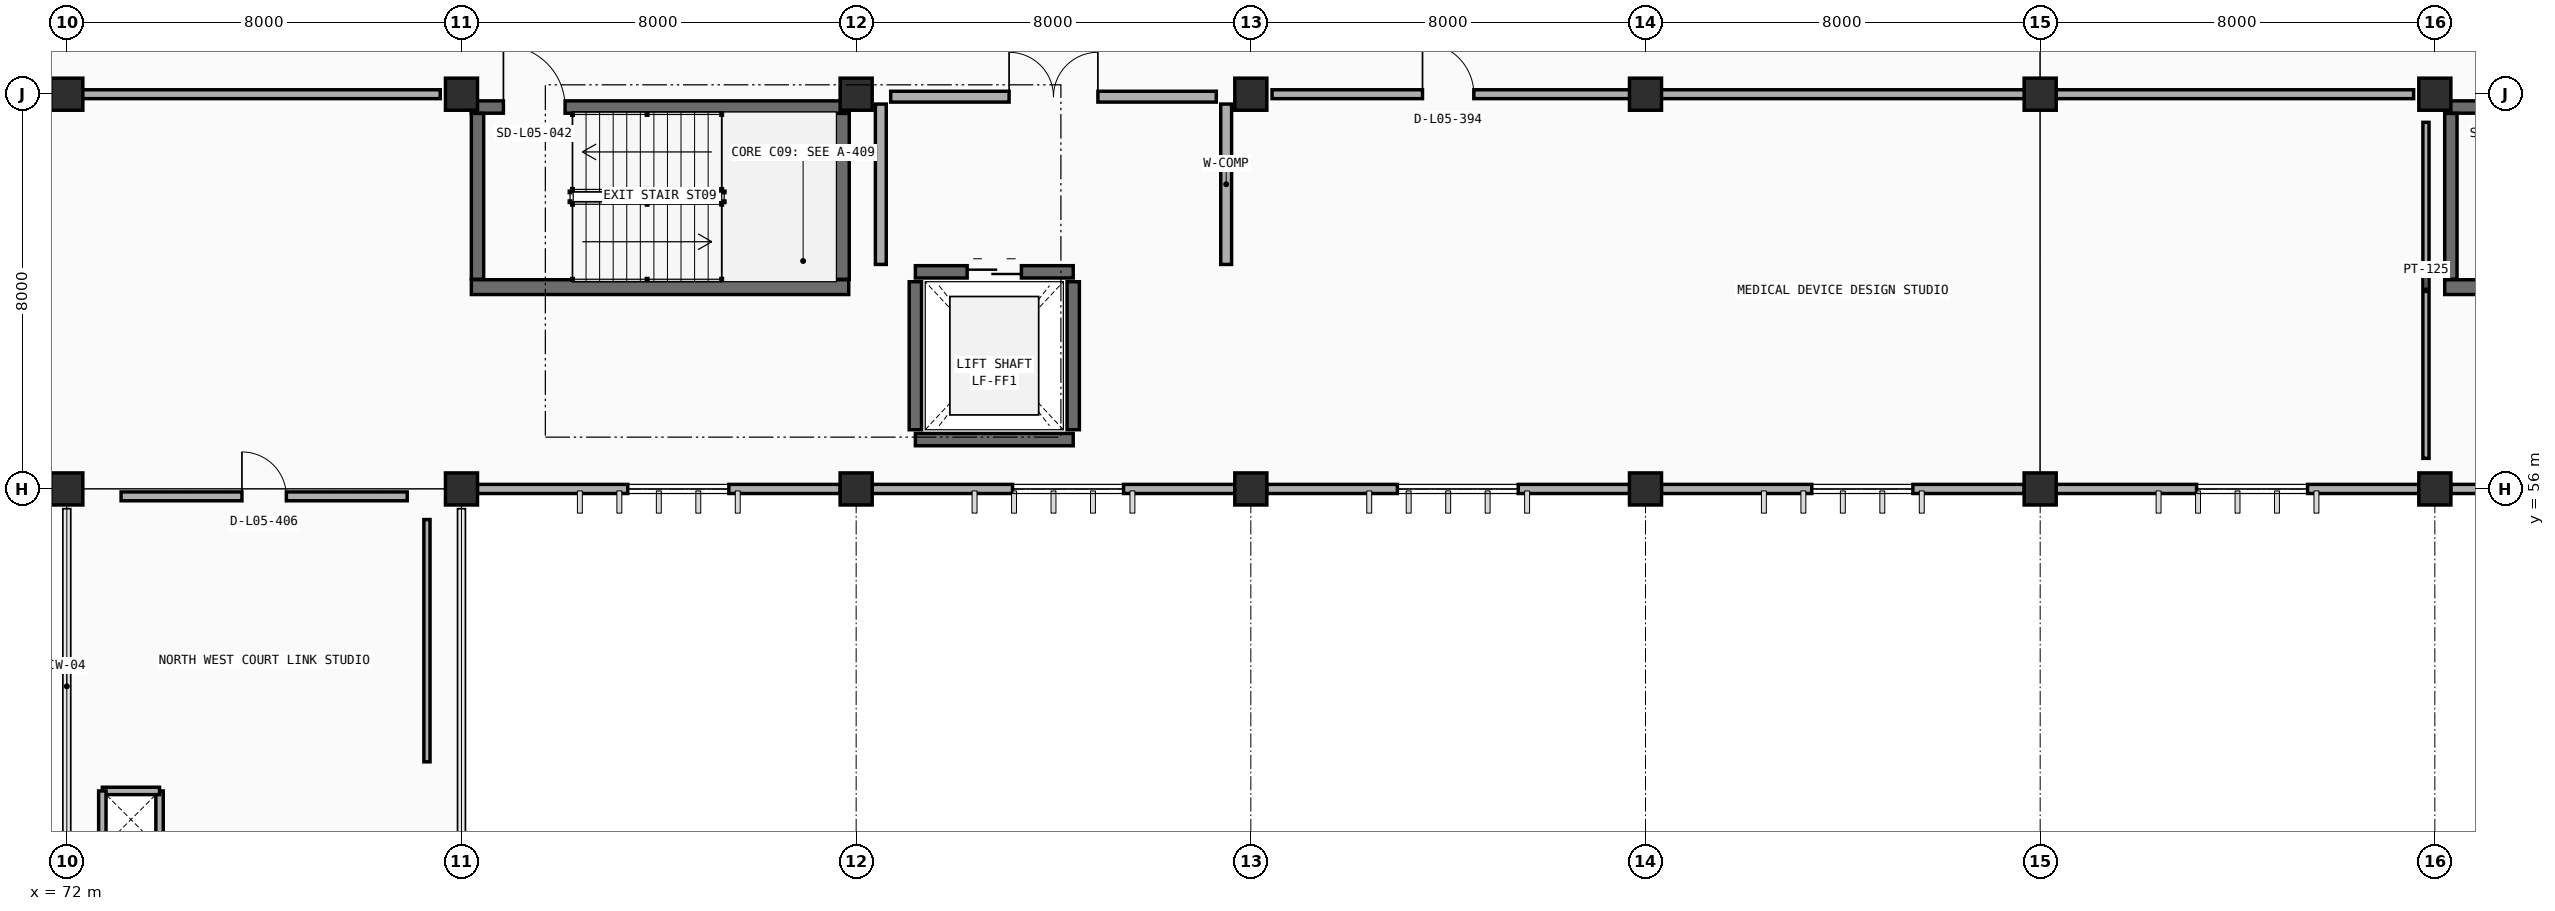
"""IFC4 building model, lengths in metres.
Left out: names, types, materials, properties, quantities, classifications, styles, units other than length and angle.
Written with IfcOpenShell. Run it as: python <this file> out.ifc"""

import sys

from ifc_helpers import new_model, si_unit, direction, frame, frame_2d, origin, origin_2d, place, context, subcontext, project, spatial, rectangle, extrude, element, fill, save


model = new_model("IFC4")
c1 = context("Model", 3, precision=1e-05, world=origin(), true_north=direction((0.0, 1.0)))
c2 = subcontext(c1, "Body", "Model", "MODEL_VIEW")
j1 = project(units=[si_unit("LENGTHUNIT", "METRE"), si_unit("PLANEANGLEUNIT", "RADIAN")], contexts=[c1])
p1 = place(None, origin())
s1 = spatial("IfcSite", under=j1, at=p1, CompositionType="ELEMENT")
p2 = place(p1, origin())
s2 = spatial("IfcBuilding", under=s1, at=p2, CompositionType="ELEMENT")
p3 = place(p2, frame((0.0, 0.0, 18.0)))
s3 = spatial("IfcBuildingStorey", under=s2, at=p3, CompositionType="ELEMENT", Elevation=18.0)
for number, where, z_axis, x_axis in (
    (1, (72.0, 56.0, 0.0), (0.0, 0.0, 1.0), (1.0, 0.0, 0.0)),
    (2, (80.0, 56.0, 0.0), (0.0, 0.0, 1.0), (1.0, 0.0, 0.0)),
    (3, (88.0, 56.0, 0.0), (0.0, 0.0, 1.0), (1.0, 0.0, 0.0)),
    (4, (96.0, 56.0, 0.0), (0.0, 0.0, 1.0), (1.0, 0.0, 0.0)),
    (5, (104.0, 56.0, 0.0), (0.0, 0.0, 1.0), (1.0, 0.0, 0.0)),
    (6, (112.0, 56.0, 0.0), (0.0, 0.0, 1.0), (1.0, 0.0, 0.0)),
    (7, (120.0, 56.0, 0.0), (0.0, 0.0, 1.0), (1.0, 0.0, 0.0)),
    (8, (72.0, 64.0, 0.0), (0.0, 0.0, 1.0), (1.0, 0.0, 0.0)),
    (9, (80.0, 64.0, 0.0), (0.0, 0.0, 1.0), (1.0, 0.0, 0.0)),
    (10, (88.0, 64.0, 0.0), (0.0, 0.0, 1.0), (1.0, 0.0, 0.0)),
    (11, (96.0, 64.0, 0.0), (0.0, 0.0, 1.0), (1.0, 0.0, 0.0)),
    (12, (104.0, 64.0, 0.0), (0.0, 0.0, 1.0), (1.0, 0.0, 0.0)),
    (13, (112.0, 64.0, 0.0), (0.0, 0.0, 1.0), (1.0, 0.0, 0.0)),
    (14, (120.0, 64.0, 0.0), (0.0, 0.0, 1.0), (1.0, 0.0, 0.0)),
):
    element("IfcColumn", number, at=place(p3, frame(where, z_axis=z_axis, x_axis=x_axis)), inside=s3, PredefinedType="COLUMN", context=c2, shape_type="SweptSolid", body=[
        extrude(rectangle(XDim=0.65, YDim=0.65, at=origin_2d()), origin(), (0.0, 0.0, 1.0), 4.2),
    ])
p4 = place(p3, frame((87.678, 56.0, 0.0), z_axis=(0.0, 0.0, 1.0), x_axis=(-1.0, 0.0, 0.0)))
e15 = element("IfcWall", 15, at=p4, inside=s3, PredefinedType="STANDARD", context=c2, shape_type="SweptSolid", body=[
    extrude(rectangle(XDim=7.356, YDim=0.185, at=frame_2d((3.678, 0.0))), origin(), (0.0, 0.0, 1.0), 3.335),
])
p5 = place(p4, frame((2.258, 0.0, 0.9)))
e16 = element("IfcOpeningElement", 16, at=p5, cuts=e15, PredefinedType="OPENING", context=c2, shape_type="SweptSolid", body=[
    extrude(rectangle(XDim=2.05, YDim=2.0, at=frame_2d((1.025, 1.0))), frame((0.0, 0.103, 0.0), z_axis=(0.0, -1.0, 0.0), x_axis=(1.0, 0.0, 0.0)), (0.0, 0.0, 1.0), 0.205),
])
p6 = place(p3, frame((95.678, 56.0, 0.0), z_axis=(0.0, 0.0, 1.0), x_axis=(-1.0, 0.0, 0.0)))
e17 = element("IfcWall", 17, at=p6, inside=s3, PredefinedType="STANDARD", context=c2, shape_type="SweptSolid", body=[
    extrude(rectangle(XDim=7.356, YDim=0.185, at=frame_2d((3.678, 0.0))), origin(), (0.0, 0.0, 1.0), 3.335),
])
p7 = place(p6, frame((2.258, 0.0, 0.9)))
e18 = element("IfcOpeningElement", 18, at=p7, cuts=e17, PredefinedType="OPENING", context=c2, shape_type="SweptSolid", body=[
    extrude(rectangle(XDim=2.25, YDim=2.0, at=frame_2d((1.125, 1.0))), frame((0.0, 0.103, 0.0), z_axis=(0.0, -1.0, 0.0), x_axis=(1.0, 0.0, 0.0)), (0.0, 0.0, 1.0), 0.205),
])
p8 = place(p3, frame((103.678, 56.0, 0.0), z_axis=(0.0, 0.0, 1.0), x_axis=(-1.0, 0.0, 0.0)))
e19 = element("IfcWall", 19, at=p8, inside=s3, PredefinedType="STANDARD", context=c2, shape_type="SweptSolid", body=[
    extrude(rectangle(XDim=7.356, YDim=0.185, at=frame_2d((3.678, 0.0))), origin(), (0.0, 0.0, 1.0), 3.335),
])
p9 = place(p8, frame((2.258, 0.0, 0.9)))
e20 = element("IfcOpeningElement", 20, at=p9, cuts=e19, PredefinedType="OPENING", context=c2, shape_type="SweptSolid", body=[
    extrude(rectangle(XDim=2.45, YDim=2.0, at=frame_2d((1.225, 1.0))), frame((0.0, 0.103, 0.0), z_axis=(0.0, -1.0, 0.0), x_axis=(1.0, 0.0, 0.0)), (0.0, 0.0, 1.0), 0.205),
])
p10 = place(p3, frame((111.678, 56.0, 0.0), z_axis=(0.0, 0.0, 1.0), x_axis=(-1.0, 0.0, 0.0)))
e21 = element("IfcWall", 21, at=p10, inside=s3, PredefinedType="STANDARD", context=c2, shape_type="SweptSolid", body=[
    extrude(rectangle(XDim=7.356, YDim=0.185, at=frame_2d((3.678, 0.0))), origin(), (0.0, 0.0, 1.0), 3.335),
])
p11 = place(p10, frame((2.258, 0.0, 0.9)))
e22 = element("IfcOpeningElement", 22, at=p11, cuts=e21, PredefinedType="OPENING", context=c2, shape_type="SweptSolid", body=[
    extrude(rectangle(XDim=2.05, YDim=2.0, at=frame_2d((1.025, 1.0))), frame((0.0, 0.103, 0.0), z_axis=(0.0, -1.0, 0.0), x_axis=(1.0, 0.0, 0.0)), (0.0, 0.0, 1.0), 0.205),
])
p12 = place(p3, frame((119.678, 56.0, 0.0), z_axis=(0.0, 0.0, 1.0), x_axis=(-1.0, 0.0, 0.0)))
e23 = element("IfcWall", 23, at=p12, inside=s3, PredefinedType="STANDARD", context=c2, shape_type="SweptSolid", body=[
    extrude(rectangle(XDim=7.356, YDim=0.185, at=frame_2d((3.678, 0.0))), origin(), (0.0, 0.0, 1.0), 3.335),
])
p13 = place(p12, frame((2.258, 0.0, 0.9)))
e24 = element("IfcOpeningElement", 24, at=p13, cuts=e23, PredefinedType="OPENING", context=c2, shape_type="SweptSolid", body=[
    extrude(rectangle(XDim=2.25, YDim=2.0, at=frame_2d((1.125, 1.0))), frame((0.0, 0.103, 0.0), z_axis=(0.0, -1.0, 0.0), x_axis=(1.0, 0.0, 0.0)), (0.0, 0.0, 1.0), 0.205),
])
p14 = place(p3, frame((127.678, 56.0, 0.0), z_axis=(0.0, 0.0, 1.0), x_axis=(-1.0, 0.0, 0.0)))
e25 = element("IfcWall", 25, at=p14, inside=s3, PredefinedType="STANDARD", context=c2, shape_type="SweptSolid", body=[
    extrude(rectangle(XDim=7.356, YDim=0.185, at=frame_2d((3.678, 0.0))), origin(), (0.0, 0.0, 1.0), 3.335),
])
p15 = place(p14, frame((2.258, 0.0, 0.9)))
e26 = element("IfcOpeningElement", 26, at=p15, cuts=e25, PredefinedType="OPENING", context=c2, shape_type="SweptSolid", body=[
    extrude(rectangle(XDim=2.45, YDim=2.0, at=frame_2d((1.225, 1.0))), frame((0.0, 0.103, 0.0), z_axis=(0.0, -1.0, 0.0), x_axis=(1.0, 0.0, 0.0)), (0.0, 0.0, 1.0), 0.205),
])
p16 = place(p3, frame((80.2, 60.09, 0.0), z_axis=(0.0, 0.0, 1.0), x_axis=(1.0, 0.0, 0.0)))
e27 = element("IfcWall", 27, at=p16, inside=s3, PredefinedType="SHEAR", context=c2, shape_type="SweptSolid", body=[
    extrude(rectangle(XDim=7.65, YDim=0.3, at=frame_2d((3.825, 0.0))), origin(), (0.0, 0.0, 1.0), 4.2),
])
p17 = place(p3, frame((87.71, 60.25, 0.0), z_axis=(0.0, 0.0, 1.0), x_axis=(0.0, 1.0, 0.0)))
e28 = element("IfcWall", 28, at=p17, inside=s3, PredefinedType="SHEAR", context=c2, shape_type="SweptSolid", body=[
    extrude(rectangle(XDim=3.36, YDim=0.3, at=frame_2d((1.68, 0.0))), origin(), (0.0, 0.0, 1.0), 4.2),
])
p18 = place(p3, frame((80.2, 63.74, 0.0), z_axis=(0.0, 0.0, 1.0), x_axis=(1.0, 0.0, 0.0)))
e29 = element("IfcWall", 29, at=p18, inside=s3, PredefinedType="SOLIDWALL", context=c2, shape_type="SweptSolid", body=[
    extrude(rectangle(XDim=7.65, YDim=0.25, at=frame_2d((3.825, 0.0))), origin(), (0.0, 0.0, 1.0), 4.2),
])
p19 = place(p18, frame((0.65, 0.0, 0.0)))
e30 = element("IfcOpeningElement", 30, at=p19, cuts=e29, PredefinedType="OPENING", context=c2, shape_type="SweptSolid", body=[
    extrude(rectangle(XDim=1.25, YDim=2.15, at=frame_2d((0.625, 1.075))), frame((0.0, 0.135, 0.0), z_axis=(0.0, -1.0, 0.0), x_axis=(1.0, 0.0, 0.0)), (0.0, 0.0, 1.0), 0.27),
])
p20 = place(p3, frame((80.325, 60.25, 0.0), z_axis=(0.0, 0.0, 1.0), x_axis=(0.0, 1.0, 0.0)))
e31 = element("IfcWall", 31, at=p20, inside=s3, PredefinedType="SOLIDWALL", context=c2, shape_type="SweptSolid", body=[
    extrude(rectangle(XDim=3.36, YDim=0.25, at=frame_2d((1.68, 0.0))), origin(), (0.0, 0.0, 1.0), 4.2),
])
p21 = place(p3, frame((120.2, 60.09, 0.0), z_axis=(0.0, 0.0, 1.0), x_axis=(1.0, 0.0, 0.0)))
e32 = element("IfcWall", 32, at=p21, inside=s3, PredefinedType="SHEAR", context=c2, shape_type="SweptSolid", body=[
    extrude(rectangle(XDim=7.65, YDim=0.3, at=frame_2d((3.825, 0.0))), origin(), (0.0, 0.0, 1.0), 4.2),
])
p22 = place(p3, frame((120.2, 63.74, 0.0), z_axis=(0.0, 0.0, 1.0), x_axis=(1.0, 0.0, 0.0)))
e33 = element("IfcWall", 33, at=p22, inside=s3, PredefinedType="SOLIDWALL", context=c2, shape_type="SweptSolid", body=[
    extrude(rectangle(XDim=7.65, YDim=0.25, at=frame_2d((3.825, 0.0))), origin(), (0.0, 0.0, 1.0), 4.2),
])
p23 = place(p22, frame((0.65, 0.0, 0.0)))
e34 = element("IfcOpeningElement", 34, at=p23, cuts=e33, PredefinedType="OPENING", context=c2, shape_type="SweptSolid", body=[
    extrude(rectangle(XDim=1.25, YDim=2.15, at=frame_2d((0.625, 1.075))), frame((0.0, 0.135, 0.0), z_axis=(0.0, -1.0, 0.0), x_axis=(1.0, 0.0, 0.0)), (0.0, 0.0, 1.0), 0.27),
])
p24 = place(p3, frame((120.325, 60.25, 0.0), z_axis=(0.0, 0.0, 1.0), x_axis=(0.0, 1.0, 0.0)))
e35 = element("IfcWall", 35, at=p24, inside=s3, PredefinedType="SOLIDWALL", context=c2, shape_type="SweptSolid", body=[
    extrude(rectangle(XDim=3.36, YDim=0.25, at=frame_2d((1.68, 0.0))), origin(), (0.0, 0.0, 1.0), 4.2),
])
p25 = place(p3, frame((89.2, 57.0, 0.0), z_axis=(0.0, 0.0, 1.0), x_axis=(1.0, 0.0, 0.0)))
e36 = element("IfcWall", 36, at=p25, inside=s3, PredefinedType="SOLIDWALL", context=c2, shape_type="SweptSolid", body=[
    extrude(rectangle(XDim=3.2, YDim=0.25, at=frame_2d((1.6, 0.0))), origin(), (0.0, 0.0, 1.0), 4.2),
])
p26 = place(p3, frame((89.2, 60.4, 0.0), z_axis=(0.0, 0.0, 1.0), x_axis=(1.0, 0.0, 0.0)))
e37 = element("IfcWall", 37, at=p26, inside=s3, PredefinedType="SOLIDWALL", context=c2, shape_type="SweptSolid", body=[
    extrude(rectangle(XDim=3.2, YDim=0.25, at=frame_2d((1.6, 0.0))), origin(), (0.0, 0.0, 1.0), 4.2),
])
p27 = place(p26, frame((1.05, 0.0, 0.0)))
e38 = element("IfcOpeningElement", 38, at=p27, cuts=e37, PredefinedType="OPENING", context=c2, shape_type="SweptSolid", body=[
    extrude(rectangle(XDim=1.1, YDim=2.15, at=frame_2d((0.55, 1.075))), frame((0.0, 0.135, 0.0), z_axis=(0.0, -1.0, 0.0), x_axis=(1.0, 0.0, 0.0)), (0.0, 0.0, 1.0), 0.27),
])
for number, where, z_axis, x_axis in (
    (39, (89.2, 57.2, 0.0), (0.0, 0.0, 1.0), (0.0, 1.0, 0.0)),
    (40, (92.4, 57.2, 0.0), (0.0, 0.0, 1.0), (0.0, 1.0, 0.0)),
):
    element("IfcWall", number, at=place(p3, frame(where, z_axis=z_axis, x_axis=x_axis)), inside=s3, PredefinedType="SOLIDWALL", context=c2, shape_type="SweptSolid", body=[
        extrude(rectangle(XDim=3.0, YDim=0.25, at=frame_2d((1.5, 0.0))), origin(), (0.0, 0.0, 1.0), 4.2),
    ])
p28 = place(p3, frame((88.7, 63.95, 0.0), z_axis=(0.0, 0.0, 1.0), x_axis=(1.0, 0.0, 0.0)))
e41 = element("IfcWall", 41, at=p28, inside=s3, PredefinedType="PARTITIONING", context=c2, shape_type="SweptSolid", body=[
    extrude(rectangle(XDim=6.6, YDim=0.22, at=frame_2d((3.3, 0.0))), origin(), (0.0, 0.0, 1.0), 3.3),
])
p29 = place(p28, frame((2.4, 0.0, 0.0)))
e42 = element("IfcOpeningElement", 42, at=p29, cuts=e41, PredefinedType="OPENING", context=c2, shape_type="SweptSolid", body=[
    extrude(rectangle(XDim=1.8, YDim=2.2, at=frame_2d((0.9, 1.1))), frame((0.0, 0.12, 0.0), z_axis=(0.0, -1.0, 0.0), x_axis=(1.0, 0.0, 0.0)), (0.0, 0.0, 1.0), 0.24),
])
for number, where, z_axis, x_axis in (
    (43, (88.5, 60.55, 0.0), (0.0, 0.0, 1.0), (0.0, 1.0, 0.0)),
    (44, (95.5, 60.55, 0.0), (0.0, 0.0, 1.0), (0.0, 1.0, 0.0)),
):
    element("IfcWall", number, at=place(p3, frame(where, z_axis=z_axis, x_axis=x_axis)), inside=s3, PredefinedType="PARTITIONING", context=c2, shape_type="SweptSolid", body=[
        extrude(rectangle(XDim=3.25, YDim=0.22, at=frame_2d((1.625, 0.0))), origin(), (0.0, 0.0, 1.0), 3.3),
    ])
for number, where, z_axis, x_axis in (
    (45, (73.88, 48.72, 0.0), (0.0, 0.0, 1.0), (0.0, 1.0, 0.0)),
    (46, (73.88, 49.88, 0.0), (0.0, 0.0, 1.0), (-1.0, 0.0, 0.0)),
    (47, (72.72, 49.88, 0.0), (0.0, 0.0, 1.0), (0.0, -1.0, 0.0)),
):
    element("IfcWall", number, at=place(p3, frame(where, z_axis=z_axis, x_axis=x_axis)), inside=s3, PredefinedType="PARTITIONING", context=c2, shape_type="SweptSolid", body=[
        extrude(rectangle(XDim=1.16, YDim=0.15, at=frame_2d((0.58, 0.0))), origin(), (0.0, 0.0, 1.0), 3.9),
    ])
p30 = place(p3, frame((56.43, 64.0, 0.0), z_axis=(0.0, 0.0, 1.0), x_axis=(1.0, 0.0, 0.0)))
e48 = element("IfcWall", 48, at=p30, inside=s3, PredefinedType="PARTITIONING", context=c2, shape_type="SweptSolid", body=[
    extrude(rectangle(XDim=23.14, YDim=0.18, at=frame_2d((11.57, 0.0))), origin(), (0.0, 0.0, 1.0), 3.3),
])
p31 = place(p30, frame((2.96, 0.0, 0.0)))
e49 = element("IfcOpeningElement", 49, at=p31, cuts=e48, PredefinedType="OPENING", context=c2, shape_type="SweptSolid", body=[
    extrude(rectangle(XDim=1.22, YDim=2.18, at=frame_2d((0.61, 1.09))), frame((0.0, 0.1, 0.0), z_axis=(0.0, -1.0, 0.0), x_axis=(1.0, 0.0, 0.0)), (0.0, 0.0, 1.0), 0.2),
])
p32 = place(p3, frame((96.43, 64.0, 0.0), z_axis=(0.0, 0.0, 1.0), x_axis=(1.0, 0.0, 0.0)))
e50 = element("IfcWall", 50, at=p32, inside=s3, PredefinedType="PARTITIONING", context=c2, shape_type="SweptSolid", body=[
    extrude(rectangle(XDim=23.14, YDim=0.18, at=frame_2d((11.57, 0.0))), origin(), (0.0, 0.0, 1.0), 3.3),
])
p33 = place(p32, frame((3.05, 0.0, 0.0)))
e51 = element("IfcOpeningElement", 51, at=p33, cuts=e50, PredefinedType="OPENING", context=c2, shape_type="SweptSolid", body=[
    extrude(rectangle(XDim=1.04, YDim=2.15, at=frame_2d((0.52, 1.075))), frame((0.0, 0.1, 0.0), z_axis=(0.0, -1.0, 0.0), x_axis=(1.0, 0.0, 0.0)), (0.0, 0.0, 1.0), 0.2),
])
p34 = place(p3, frame((119.82, 56.62, 0.0), z_axis=(0.0, 0.0, 1.0), x_axis=(0.0, 1.0, 0.0)))
e52 = element("IfcWall", 52, at=p34, inside=s3, PredefinedType="PARTITIONING", context=c2, shape_type="SweptSolid", body=[
    extrude(rectangle(XDim=6.81, YDim=0.125, at=frame_2d((3.405, 0.0))), origin(), (0.0, 0.0, 1.0), 3.3),
])
p35 = place(p3, frame((73.1, 55.85, 0.0), z_axis=(0.0, 0.0, 1.0), x_axis=(1.0, 0.0, 0.0)))
e53 = element("IfcWall", 53, at=p35, inside=s3, PredefinedType="PARTITIONING", context=c2, shape_type="SweptSolid", body=[
    extrude(rectangle(XDim=5.8, YDim=0.18, at=frame_2d((2.9, 0.0))), origin(), (0.0, 0.0, 1.0), 3.3),
])
p36 = place(p35, frame((2.45, 0.0, 0.0)))
e54 = element("IfcOpeningElement", 54, at=p36, cuts=e53, PredefinedType="OPENING", context=c2, shape_type="SweptSolid", body=[
    extrude(rectangle(XDim=0.9, YDim=2.1, at=frame_2d((0.45, 1.05))), frame((0.0, 0.1, 0.0), z_axis=(0.0, -1.0, 0.0), x_axis=(1.0, 0.0, 0.0)), (0.0, 0.0, 1.0), 0.2),
])
p37 = place(p3, frame((79.3, 50.47, 0.0), z_axis=(0.0, 0.0, 1.0), x_axis=(0.0, 1.0, 0.0)))
e55 = element("IfcWall", 55, at=p37, inside=s3, PredefinedType="PARTITIONING", context=c2, shape_type="SweptSolid", body=[
    extrude(rectangle(XDim=4.91, YDim=0.125, at=frame_2d((2.455, 0.0))), origin(), (0.0, 0.0, 1.0), 3.3),
])
p38 = place(p5, origin())
e56 = element("IfcWindow", 56, at=p38, inside=s3, PartitioningType="DOUBLE_PANEL_VERTICAL", PredefinedType="WINDOW", context=c2, shape_type="SweptSolid", body=[
    extrude(rectangle(XDim=2.05, YDim=2.0, at=frame_2d((1.025, 1.0))), frame((0.0, 0.03, 0.0), z_axis=(0.0, -1.0, 0.0), x_axis=(1.0, 0.0, 0.0)), (0.0, 0.0, 1.0), 0.06),
])
fill(e16, e56)
p39 = place(p7, origin())
e57 = element("IfcWindow", 57, at=p39, inside=s3, PartitioningType="DOUBLE_PANEL_VERTICAL", PredefinedType="WINDOW", context=c2, shape_type="SweptSolid", body=[
    extrude(rectangle(XDim=2.25, YDim=2.0, at=frame_2d((1.125, 1.0))), frame((0.0, 0.03, 0.0), z_axis=(0.0, -1.0, 0.0), x_axis=(1.0, 0.0, 0.0)), (0.0, 0.0, 1.0), 0.06),
])
fill(e18, e57)
p40 = place(p9, origin())
e58 = element("IfcWindow", 58, at=p40, inside=s3, PartitioningType="DOUBLE_PANEL_VERTICAL", PredefinedType="WINDOW", context=c2, shape_type="SweptSolid", body=[
    extrude(rectangle(XDim=2.45, YDim=2.0, at=frame_2d((1.225, 1.0))), frame((0.0, 0.03, 0.0), z_axis=(0.0, -1.0, 0.0), x_axis=(1.0, 0.0, 0.0)), (0.0, 0.0, 1.0), 0.06),
])
fill(e20, e58)
p41 = place(p11, origin())
e59 = element("IfcWindow", 59, at=p41, inside=s3, PartitioningType="DOUBLE_PANEL_VERTICAL", PredefinedType="WINDOW", context=c2, shape_type="SweptSolid", body=[
    extrude(rectangle(XDim=2.05, YDim=2.0, at=frame_2d((1.025, 1.0))), frame((0.0, 0.03, 0.0), z_axis=(0.0, -1.0, 0.0), x_axis=(1.0, 0.0, 0.0)), (0.0, 0.0, 1.0), 0.06),
])
fill(e22, e59)
p42 = place(p13, origin())
e60 = element("IfcWindow", 60, at=p42, inside=s3, PartitioningType="DOUBLE_PANEL_VERTICAL", PredefinedType="WINDOW", context=c2, shape_type="SweptSolid", body=[
    extrude(rectangle(XDim=2.25, YDim=2.0, at=frame_2d((1.125, 1.0))), frame((0.0, 0.03, 0.0), z_axis=(0.0, -1.0, 0.0), x_axis=(1.0, 0.0, 0.0)), (0.0, 0.0, 1.0), 0.06),
])
fill(e24, e60)
p43 = place(p19, origin())
e61 = element("IfcDoor", 61, at=p43, inside=s3, OperationType="SINGLE_SWING_LEFT", PredefinedType="DOOR", context=c2, shape_type="SweptSolid", body=[
    extrude(rectangle(XDim=1.25, YDim=2.15, at=frame_2d((0.625, 1.075))), frame((0.0, 0.025, 0.0), z_axis=(0.0, -1.0, 0.0), x_axis=(1.0, 0.0, 0.0)), (0.0, 0.0, 1.0), 0.05),
])
fill(e30, e61)
p44 = place(p27, origin())
e62 = element("IfcDoor", 62, at=p44, inside=s3, OperationType="DOUBLE_DOOR_SLIDING", PredefinedType="DOOR", context=c2, shape_type="SweptSolid", body=[
    extrude(rectangle(XDim=1.1, YDim=2.15, at=frame_2d((0.55, 1.075))), frame((0.0, 0.025, 0.0), z_axis=(0.0, -1.0, 0.0), x_axis=(1.0, 0.0, 0.0)), (0.0, 0.0, 1.0), 0.05),
])
fill(e38, e62)
p45 = place(p29, origin())
e63 = element("IfcDoor", 63, at=p45, inside=s3, OperationType="DOUBLE_DOOR_SINGLE_SWING", PredefinedType="DOOR", context=c2, shape_type="SweptSolid", body=[
    extrude(rectangle(XDim=1.8, YDim=2.2, at=frame_2d((0.9, 1.1))), frame((0.0, 0.025, 0.0), z_axis=(0.0, -1.0, 0.0), x_axis=(1.0, 0.0, 0.0)), (0.0, 0.0, 1.0), 0.05),
])
fill(e42, e63)
p46 = place(p33, origin())
e64 = element("IfcDoor", 64, at=p46, inside=s3, OperationType="SINGLE_SWING_LEFT", PredefinedType="DOOR", context=c2, shape_type="SweptSolid", body=[
    extrude(rectangle(XDim=1.04, YDim=2.15, at=frame_2d((0.52, 1.075))), frame((0.0, 0.025, 0.0), z_axis=(0.0, -1.0, 0.0), x_axis=(1.0, 0.0, 0.0)), (0.0, 0.0, 1.0), 0.05),
])
fill(e51, e64)
p47 = place(p36, origin())
e65 = element("IfcDoor", 65, at=p47, inside=s3, OperationType="SINGLE_SWING_LEFT", PredefinedType="DOOR", context=c2, shape_type="SweptSolid", body=[
    extrude(rectangle(XDim=0.9, YDim=2.1, at=frame_2d((0.45, 1.05))), frame((0.0, 0.025, 0.0), z_axis=(0.0, -1.0, 0.0), x_axis=(1.0, 0.0, 0.0)), (0.0, 0.0, 1.0), 0.05),
])
fill(e54, e65)
save(model, sys.argv[1])
